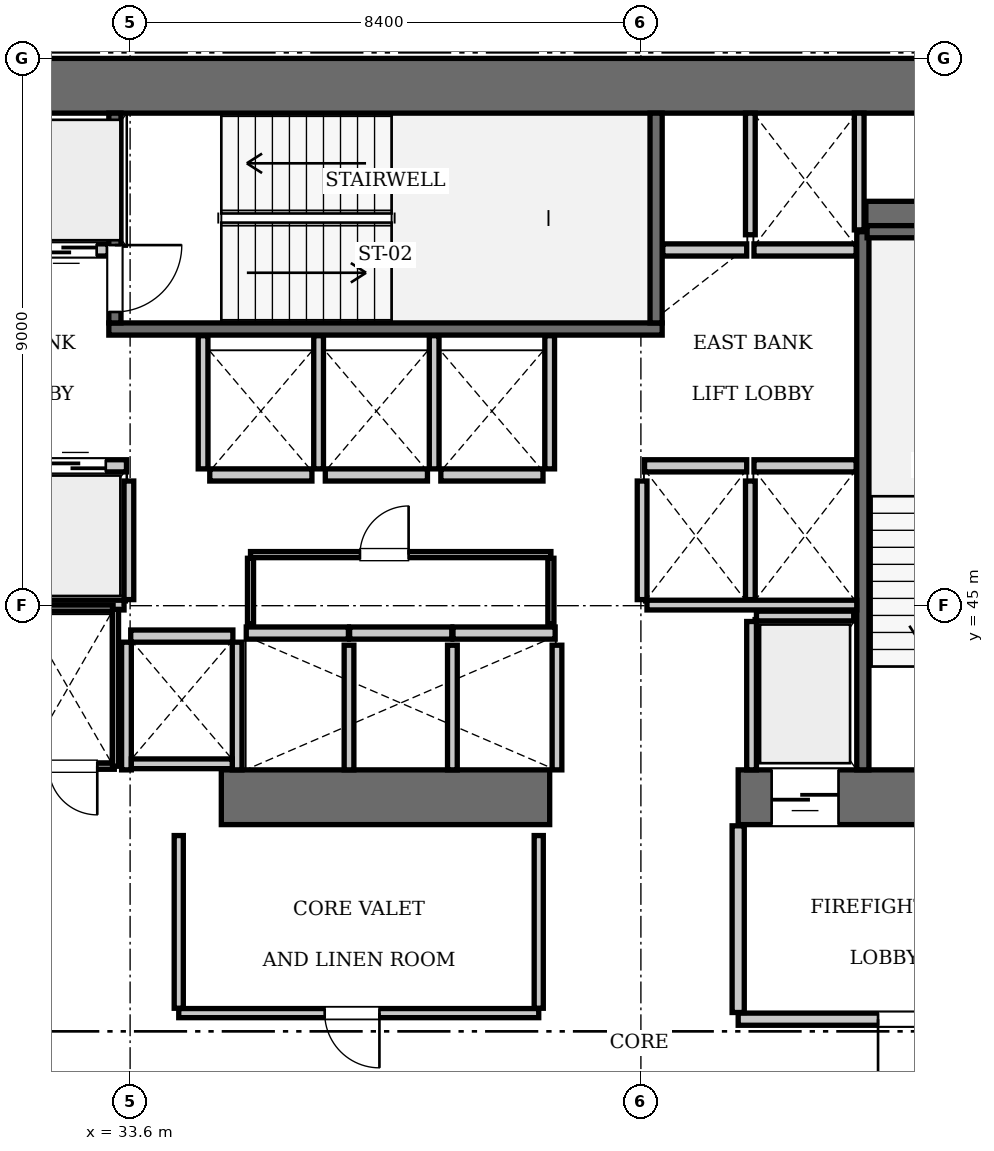
"""IFC4 building model, lengths in metres.
Left out: names, types, materials, properties, quantities, classifications, styles, units other than length and angle.
Written with IfcOpenShell. Run it as: python <this file> out.ifc"""

import sys

from ifc_helpers import new_model, si_unit, direction, frame, frame_2d, origin, place, context, subcontext, project, spatial, rectangle, extrude, element, fill, save


model = new_model("IFC4")
c1 = context("Model", 3, precision=1e-05, world=origin(), true_north=direction((0.0, 1.0)))
c2 = subcontext(c1, "Body", "Model", "MODEL_VIEW")
j1 = project(units=[si_unit("LENGTHUNIT", "METRE"), si_unit("PLANEANGLEUNIT", "RADIAN")], contexts=[c1])
p1 = place(None, origin())
s1 = spatial("IfcSite", under=j1, at=p1, CompositionType="ELEMENT")
p2 = place(p1, origin())
s2 = spatial("IfcBuilding", under=s1, at=p2, CompositionType="ELEMENT")
p3 = place(p2, frame((0.0, 0.0, 77.0)))
s3 = spatial("IfcBuildingStorey", under=s2, at=p3, CompositionType="ELEMENT", Elevation=77.0)
p4 = place(p3, frame((25.2, 53.55, 0.0), z_axis=(0.0, 0.0, 1.0), x_axis=(1.0, 0.0, 0.0)))
e1 = element("IfcWall", 1, at=p4, inside=s3, PredefinedType="SHEAR", context=c2, shape_type="SweptSolid", body=[
    extrude(rectangle(XDim=25.2, YDim=0.9, at=frame_2d((12.6, 0.0))), origin(), (0.0, 0.0, 1.0), 3.85),
])
p5 = place(p3, frame((35.1, 41.85, 0.0), z_axis=(0.0, 0.0, 1.0), x_axis=(1.0, 0.0, 0.0)))
e2 = element("IfcWall", 2, at=p5, inside=s3, PredefinedType="SHEAR", context=c2, shape_type="SweptSolid", body=[
    extrude(rectangle(XDim=5.4, YDim=0.9, at=frame_2d((2.7, 0.0))), origin(), (0.0, 0.0, 1.0), 3.85),
])
p6 = place(p3, frame((43.6, 41.85, 0.0), z_axis=(0.0, 0.0, 1.0), x_axis=(1.0, 0.0, 0.0)))
e3 = element("IfcWall", 3, at=p6, inside=s3, PredefinedType="SHEAR", context=c2, shape_type="SweptSolid", body=[
    extrude(rectangle(XDim=6.8, YDim=0.9, at=frame_2d((3.4, 0.0))), origin(), (0.0, 0.0, 1.0), 3.85),
])
p7 = place(p6, frame((3.9, 0.0, 0.0)))
e4 = element("IfcOpeningElement", 4, at=p7, cuts=e3, PredefinedType="OPENING", context=c2, shape_type="SweptSolid", body=[
    extrude(rectangle(XDim=1.15, YDim=2.15, at=frame_2d((0.575, 1.075))), frame((0.0, 0.46, 0.0), z_axis=(0.0, -1.0, 0.0), x_axis=(1.0, 0.0, 0.0)), (0.0, 0.0, 1.0), 0.92),
])
p8 = place(p6, frame((0.55, 0.0, 0.0)))
e5 = element("IfcOpeningElement", 5, at=p8, cuts=e3, PredefinedType="OPENING", context=c2, shape_type="SweptSolid", body=[
    extrude(rectangle(XDim=1.1, YDim=2.2, at=frame_2d((0.55, 1.1))), frame((0.0, 0.46, 0.0), z_axis=(0.0, -1.0, 0.0), x_axis=(1.0, 0.0, 0.0)), (0.0, 0.0, 1.0), 0.92),
])
p9 = place(p3, frame((45.7, 51.4, 0.0), z_axis=(0.0, 0.0, 1.0), x_axis=(1.0, 0.0, 0.0)))
e6 = element("IfcWall", 6, at=p9, inside=s3, PredefinedType="SHEAR", context=c2, shape_type="SweptSolid", body=[
    extrude(rectangle(XDim=3.8, YDim=0.5, at=frame_2d((1.9, 0.0))), origin(), (0.0, 0.0, 1.0), 3.85),
])
p10 = place(p3, frame((33.25, 49.55, 0.0), z_axis=(0.0, 0.0, 1.0), x_axis=(1.0, 0.0, 0.0)))
e7 = element("IfcWall", 7, at=p10, inside=s3, PredefinedType="SOLIDWALL", context=c2, shape_type="SweptSolid", body=[
    extrude(rectangle(XDim=9.1, YDim=0.2, at=frame_2d((4.55, 0.0))), origin(), (0.0, 0.0, 1.0), 3.61),
])
p11 = place(p3, frame((42.25, 49.65, 0.0), z_axis=(0.0, 0.0, 1.0), x_axis=(0.0, 1.0, 0.0)))
e8 = element("IfcWall", 8, at=p11, inside=s3, PredefinedType="SOLIDWALL", context=c2, shape_type="SweptSolid", body=[
    extrude(rectangle(XDim=3.45, YDim=0.2, at=frame_2d((1.725, 0.0))), origin(), (0.0, 0.0, 1.0), 3.61),
])
p12 = place(p3, frame((33.35, 49.65, 0.0), z_axis=(0.0, 0.0, 1.0), x_axis=(0.0, 1.0, 0.0)))
e9 = element("IfcWall", 9, at=p12, inside=s3, PredefinedType="SOLIDWALL", context=c2, shape_type="SweptSolid", body=[
    extrude(rectangle(XDim=3.45, YDim=0.2, at=frame_2d((1.725, 0.0))), origin(), (0.0, 0.0, 1.0), 3.61),
])
p13 = place(p12, frame((0.18, 0.0, 0.0)))
e10 = element("IfcOpeningElement", 10, at=p13, cuts=e9, PredefinedType="OPENING", context=c2, shape_type="SweptSolid", body=[
    extrude(rectangle(XDim=1.1, YDim=2.15, at=frame_2d((0.55, 1.075))), frame((0.0, 0.11, 0.0), z_axis=(0.0, -1.0, 0.0), x_axis=(1.0, 0.0, 0.0)), (0.0, 0.0, 1.0), 0.22),
])
p14 = place(p3, frame((45.65, 42.3, 0.0), z_axis=(0.0, 0.0, 1.0), x_axis=(0.0, 1.0, 0.0)))
e11 = element("IfcWall", 11, at=p14, inside=s3, PredefinedType="SOLIDWALL", context=c2, shape_type="SweptSolid", body=[
    extrude(rectangle(XDim=8.85, YDim=0.2, at=frame_2d((4.425, 0.0))), origin(), (0.0, 0.0, 1.0), 3.61),
])
p15 = place(p3, frame((45.72, 51.15, 0.0), z_axis=(0.0, 0.0, 1.0), x_axis=(1.0, 0.0, 0.0)))
e12 = element("IfcWall", 12, at=p15, inside=s3, PredefinedType="SOLIDWALL", context=c2, shape_type="SweptSolid", body=[
    extrude(rectangle(XDim=3.5, YDim=0.2, at=frame_2d((1.75, 0.0))), origin(), (0.0, 0.0, 1.0), 3.61),
])
p16 = place(p3, frame((31.86, 47.3, 0.0), z_axis=(0.0, 0.0, 1.0), x_axis=(1.0, 0.0, 0.0)))
e13 = element("IfcWall", 13, at=p16, inside=s3, PredefinedType="SOLIDWALL", context=c2, shape_type="SweptSolid", body=[
    extrude(rectangle(XDim=1.68, YDim=0.2, at=frame_2d((0.84, 0.0))), origin(), (0.0, 0.0, 1.0), 3.61),
])
p17 = place(p16, frame((0.34, 0.0, 0.0)))
e14 = element("IfcOpeningElement", 14, at=p17, cuts=e13, PredefinedType="OPENING", context=c2, shape_type="SweptSolid", body=[
    extrude(rectangle(XDim=1.0, YDim=2.15, at=frame_2d((0.5, 1.075))), frame((0.0, 0.11, 0.0), z_axis=(0.0, -1.0, 0.0), x_axis=(1.0, 0.0, 0.0)), (0.0, 0.0, 1.0), 0.22),
])
p18 = place(p3, frame((31.86, 50.85, 0.0), z_axis=(0.0, 0.0, 1.0), x_axis=(1.0, 0.0, 0.0)))
e15 = element("IfcWall", 15, at=p18, inside=s3, PredefinedType="SOLIDWALL", context=c2, shape_type="SweptSolid", body=[
    extrude(rectangle(XDim=1.38, YDim=0.2, at=frame_2d((0.69, 0.0))), origin(), (0.0, 0.0, 1.0), 3.61),
])
p19 = place(p18, frame((0.19, 0.0, 0.0)))
e16 = element("IfcOpeningElement", 16, at=p19, cuts=e15, PredefinedType="OPENING", context=c2, shape_type="SweptSolid", body=[
    extrude(rectangle(XDim=1.0, YDim=2.15, at=frame_2d((0.5, 1.075))), frame((0.0, 0.11, 0.0), z_axis=(0.0, -1.0, 0.0), x_axis=(1.0, 0.0, 0.0)), (0.0, 0.0, 1.0), 0.22),
])
for number, where, z_axis, x_axis in (
    (17, (42.06, 47.3, 0.0), (0.0, 0.0, 1.0), (1.0, 0.0, 0.0)),
    (18, (43.86, 47.3, 0.0), (0.0, 0.0, 1.0), (1.0, 0.0, 0.0)),
):
    element("IfcWall", number, at=place(p3, frame(where, z_axis=z_axis, x_axis=x_axis)), inside=s3, PredefinedType="SOLIDWALL", context=c2, shape_type="SweptSolid", body=[
        extrude(rectangle(XDim=1.68, YDim=0.2, at=frame_2d((0.84, 0.0))), origin(), (0.0, 0.0, 1.0), 3.61),
    ])
p20 = place(p3, frame((42.36, 50.85, 0.0), z_axis=(0.0, 0.0, 1.0), x_axis=(1.0, 0.0, 0.0)))
e19 = element("IfcWall", 19, at=p20, inside=s3, PredefinedType="SOLIDWALL", context=c2, shape_type="SweptSolid", body=[
    extrude(rectangle(XDim=1.38, YDim=0.2, at=frame_2d((0.69, 0.0))), origin(), (0.0, 0.0, 1.0), 3.61),
])
for number, where, z_axis, x_axis in (
    (20, (43.86, 50.85, 0.0), (0.0, 0.0, 1.0), (1.0, 0.0, 0.0)),
    (21, (35.51, 44.55, 0.0), (0.0, 0.0, 1.0), (1.0, 0.0, 0.0)),
    (22, (37.21, 44.55, 0.0), (0.0, 0.0, 1.0), (1.0, 0.0, 0.0)),
):
    element("IfcWall", number, at=place(p3, frame(where, z_axis=z_axis, x_axis=x_axis)), inside=s3, PredefinedType="SOLIDWALL", context=c2, shape_type="SweptSolid", body=[
        extrude(rectangle(XDim=1.68, YDim=0.2, at=frame_2d((0.84, 0.0))), origin(), (0.0, 0.0, 1.0), 3.61),
    ])
for number, where, z_axis, x_axis in (
    (23, (38.91, 44.55, 0.0), (0.0, 0.0, 1.0), (1.0, 0.0, 0.0)),
    (24, (34.91, 47.15, 0.0), (0.0, 0.0, 1.0), (1.0, 0.0, 0.0)),
):
    element("IfcWall", number, at=place(p3, frame(where, z_axis=z_axis, x_axis=x_axis)), inside=s3, PredefinedType="SOLIDWALL", context=c2, shape_type="SweptSolid", body=[
        extrude(rectangle(XDim=1.68, YDim=0.2, at=frame_2d((0.84, 0.0))), origin(), (0.0, 0.0, 1.0), 3.61),
    ])
for number, where, z_axis, x_axis in (
    (25, (36.81, 47.15, 0.0), (0.0, 0.0, 1.0), (1.0, 0.0, 0.0)),
    (26, (38.71, 47.15, 0.0), (0.0, 0.0, 1.0), (1.0, 0.0, 0.0)),
    (27, (33.61, 44.5, 0.0), (0.0, 0.0, 1.0), (1.0, 0.0, 0.0)),
):
    element("IfcWall", number, at=place(p3, frame(where, z_axis=z_axis, x_axis=x_axis)), inside=s3, PredefinedType="SOLIDWALL", context=c2, shape_type="SweptSolid", body=[
        extrude(rectangle(XDim=1.68, YDim=0.2, at=frame_2d((0.84, 0.0))), origin(), (0.0, 0.0, 1.0), 3.61),
    ])
p21 = place(p3, frame((43.9, 44.83, 0.0), z_axis=(0.0, 0.0, 1.0), x_axis=(1.0, 0.0, 0.0)))
e28 = element("IfcWall", 28, at=p21, inside=s3, PredefinedType="SOLIDWALL", context=c2, shape_type="SweptSolid", body=[
    extrude(rectangle(XDim=1.6, YDim=0.16, at=frame_2d((0.8, 0.0))), origin(), (0.0, 0.0, 1.0), 3.61),
])
p22 = place(p3, frame((43.82, 42.3, 0.0), z_axis=(0.0, 0.0, 1.0), x_axis=(0.0, 1.0, 0.0)))
e29 = element("IfcWall", 29, at=p22, inside=s3, PredefinedType="SOLIDWALL", context=c2, shape_type="SweptSolid", body=[
    extrude(rectangle(XDim=2.44, YDim=0.16, at=frame_2d((1.22, 0.0))), origin(), (0.0, 0.0, 1.0), 3.61),
])
p23 = place(p3, frame((33.58, 45.1, 0.0), z_axis=(0.0, 0.0, 1.0), x_axis=(0.0, 1.0, 0.0)))
e30 = element("IfcWall", 30, at=p23, inside=s3, PredefinedType="SOLIDWALL", context=c2, shape_type="SweptSolid", body=[
    extrude(rectangle(XDim=1.95, YDim=0.16, at=frame_2d((0.975, 0.0))), origin(), (0.0, 0.0, 1.0), 3.61),
])
p24 = place(p3, frame((30.05, 45.01, 0.0), z_axis=(0.0, 0.0, 1.0), x_axis=(1.0, 0.0, 0.0)))
e31 = element("IfcWall", 31, at=p24, inside=s3, PredefinedType="SOLIDWALL", context=c2, shape_type="SweptSolid", body=[
    extrude(rectangle(XDim=3.45, YDim=0.16, at=frame_2d((1.725, 0.0))), origin(), (0.0, 0.0, 1.0), 3.61),
])
for number, where, z_axis, x_axis in (
    (32, (42.02, 45.1, 0.0), (0.0, 0.0, 1.0), (0.0, 1.0, 0.0)),
    (33, (43.8, 45.1, 0.0), (0.0, 0.0, 1.0), (0.0, 1.0, 0.0)),
):
    element("IfcWall", number, at=place(p3, frame(where, z_axis=z_axis, x_axis=x_axis)), inside=s3, PredefinedType="SOLIDWALL", context=c2, shape_type="SweptSolid", body=[
        extrude(rectangle(XDim=1.95, YDim=0.16, at=frame_2d((0.975, 0.0))), origin(), (0.0, 0.0, 1.0), 3.61),
    ])
p25 = place(p3, frame((42.1, 45.01, 0.0), z_axis=(0.0, 0.0, 1.0), x_axis=(1.0, 0.0, 0.0)))
e34 = element("IfcWall", 34, at=p25, inside=s3, PredefinedType="SOLIDWALL", context=c2, shape_type="SweptSolid", body=[
    extrude(rectangle(XDim=3.45, YDim=0.16, at=frame_2d((1.725, 0.0))), origin(), (0.0, 0.0, 1.0), 3.61),
])
p26 = place(p3, frame((45.59, 51.18, 0.0), z_axis=(0.0, 0.0, 1.0), x_axis=(0.0, 1.0, 0.0)))
e35 = element("IfcWall", 35, at=p26, inside=s3, PredefinedType="SOLIDWALL", context=c2, shape_type="SweptSolid", body=[
    extrude(rectangle(XDim=1.92, YDim=0.16, at=frame_2d((0.96, 0.0))), origin(), (0.0, 0.0, 1.0), 3.61),
])
p27 = place(p3, frame((43.8, 51.1, 0.0), z_axis=(0.0, 0.0, 1.0), x_axis=(0.0, 1.0, 0.0)))
e36 = element("IfcWall", 36, at=p27, inside=s3, PredefinedType="SOLIDWALL", context=c2, shape_type="SweptSolid", body=[
    extrude(rectangle(XDim=2.0, YDim=0.16, at=frame_2d((1.0, 0.0))), origin(), (0.0, 0.0, 1.0), 3.61),
])
for number, where, z_axis, x_axis in (
    (37, (37.2, 42.3, 0.0), (0.0, 0.0, 1.0), (0.0, 1.0, 0.0)),
    (38, (38.9, 42.3, 0.0), (0.0, 0.0, 1.0), (0.0, 1.0, 0.0)),
    (39, (40.62, 42.3, 0.0), (0.0, 0.0, 1.0), (0.0, 1.0, 0.0)),
):
    element("IfcWall", number, at=place(p3, frame(where, z_axis=z_axis, x_axis=x_axis)), inside=s3, PredefinedType="SOLIDWALL", context=c2, shape_type="SweptSolid", body=[
        extrude(rectangle(XDim=2.05, YDim=0.16, at=frame_2d((1.025, 0.0))), origin(), (0.0, 0.0, 1.0), 3.61),
    ])
for number, where, z_axis, x_axis in (
    (40, (34.8, 47.25, 0.0), (0.0, 0.0, 1.0), (0.0, 1.0, 0.0)),
    (41, (36.7, 47.25, 0.0), (0.0, 0.0, 1.0), (0.0, 1.0, 0.0)),
    (42, (38.6, 47.25, 0.0), (0.0, 0.0, 1.0), (0.0, 1.0, 0.0)),
    (43, (40.5, 47.25, 0.0), (0.0, 0.0, 1.0), (0.0, 1.0, 0.0)),
):
    element("IfcWall", number, at=place(p3, frame(where, z_axis=z_axis, x_axis=x_axis)), inside=s3, PredefinedType="SOLIDWALL", context=c2, shape_type="SweptSolid", body=[
        extrude(rectangle(XDim=2.19, YDim=0.16, at=frame_2d((1.095, 0.0))), origin(), (0.0, 0.0, 1.0), 3.61),
    ])
for number, where, z_axis, x_axis in (
    (44, (33.54, 42.3, 0.0), (0.0, 0.0, 1.0), (0.0, 1.0, 0.0)),
    (45, (35.36, 42.3, 0.0), (0.0, 0.0, 1.0), (0.0, 1.0, 0.0)),
):
    element("IfcWall", number, at=place(p3, frame(where, z_axis=z_axis, x_axis=x_axis)), inside=s3, PredefinedType="SOLIDWALL", context=c2, shape_type="SweptSolid", body=[
        extrude(rectangle(XDim=2.1, YDim=0.16, at=frame_2d((1.05, 0.0))), origin(), (0.0, 0.0, 1.0), 3.61),
    ])
p28 = place(p3, frame((33.62, 42.4, 0.0), z_axis=(0.0, 0.0, 1.0), x_axis=(1.0, 0.0, 0.0)))
e46 = element("IfcWall", 46, at=p28, inside=s3, PredefinedType="SOLIDWALL", context=c2, shape_type="SweptSolid", body=[
    extrude(rectangle(XDim=1.66, YDim=0.16, at=frame_2d((0.83, 0.0))), origin(), (0.0, 0.0, 1.0), 3.61),
])
p29 = place(p3, frame((43.6, 38.2, 0.0), z_axis=(0.0, 0.0, 1.0), x_axis=(1.0, 0.0, 0.0)))
e47 = element("IfcWall", 47, at=p29, inside=s3, PredefinedType="PARTITIONING", context=c2, shape_type="SweptSolid", body=[
    extrude(rectangle(XDim=5.8, YDim=0.2, at=frame_2d((2.9, 0.0))), origin(), (0.0, 0.0, 1.0), 3.61),
])
p30 = place(p29, frame((2.3, 0.0, 0.0)))
e48 = element("IfcOpeningElement", 48, at=p30, cuts=e47, PredefinedType="OPENING", context=c2, shape_type="SweptSolid", body=[
    extrude(rectangle(XDim=1.15, YDim=2.15, at=frame_2d((0.575, 1.075))), frame((0.0, 0.11, 0.0), z_axis=(0.0, -1.0, 0.0), x_axis=(1.0, 0.0, 0.0)), (0.0, 0.0, 1.0), 0.22),
])
p31 = place(p3, frame((43.6, 38.31, 0.0), z_axis=(0.0, 0.0, 1.0), x_axis=(0.0, 1.0, 0.0)))
e49 = element("IfcWall", 49, at=p31, inside=s3, PredefinedType="PARTITIONING", context=c2, shape_type="SweptSolid", body=[
    extrude(rectangle(XDim=3.07, YDim=0.2, at=frame_2d((1.535, 0.0))), origin(), (0.0, 0.0, 1.0), 3.61),
])
p32 = place(p3, frame((32.02, 42.36, 0.0), z_axis=(0.0, 0.0, 1.0), x_axis=(1.0, 0.0, 0.0)))
e50 = element("IfcWall", 50, at=p32, inside=s3, PredefinedType="PARTITIONING", context=c2, shape_type="SweptSolid", body=[
    extrude(rectangle(XDim=1.32, YDim=0.1, at=frame_2d((0.66, 0.0))), origin(), (0.0, 0.0, 1.0), 3.61),
])
p33 = place(p32, frame((0.24, 0.0, 0.0)))
e51 = element("IfcOpeningElement", 51, at=p33, cuts=e50, PredefinedType="OPENING", context=c2, shape_type="SweptSolid", body=[
    extrude(rectangle(XDim=0.8, YDim=2.05, at=frame_2d((0.4, 1.025))), frame((0.0, 0.06, 0.0), z_axis=(0.0, -1.0, 0.0), x_axis=(1.0, 0.0, 0.0)), (0.0, 0.0, 1.0), 0.12),
])
p34 = place(p3, frame((31.84, 44.96, 0.0), z_axis=(0.0, 0.0, 1.0), x_axis=(1.0, 0.0, 0.0)))
e52 = element("IfcWall", 52, at=p34, inside=s3, PredefinedType="PARTITIONING", context=c2, shape_type="SweptSolid", body=[
    extrude(rectangle(XDim=1.48, YDim=0.1, at=frame_2d((0.74, 0.0))), origin(), (0.0, 0.0, 1.0), 3.61),
])
p35 = place(p3, frame((33.36, 42.36, 0.0), z_axis=(0.0, 0.0, 1.0), x_axis=(0.0, 1.0, 0.0)))
e53 = element("IfcWall", 53, at=p35, inside=s3, PredefinedType="PARTITIONING", context=c2, shape_type="SweptSolid", body=[
    extrude(rectangle(XDim=2.58, YDim=0.1, at=frame_2d((1.29, 0.0))), origin(), (0.0, 0.0, 1.0), 3.61),
])
p36 = place(p3, frame((35.58, 45.84, 0.0), z_axis=(0.0, 0.0, 1.0), x_axis=(1.0, 0.0, 0.0)))
e54 = element("IfcWall", 54, at=p36, inside=s3, PredefinedType="PARTITIONING", context=c2, shape_type="SweptSolid", body=[
    extrude(rectangle(XDim=4.94, YDim=0.1, at=frame_2d((2.47, 0.0))), origin(), (0.0, 0.0, 1.0), 3.61),
])
p37 = place(p36, frame((1.8, 0.0, 0.0)))
e55 = element("IfcOpeningElement", 55, at=p37, cuts=e54, PredefinedType="OPENING", context=c2, shape_type="SweptSolid", body=[
    extrude(rectangle(XDim=0.8, YDim=2.05, at=frame_2d((0.4, 1.025))), frame((0.0, 0.06, 0.0), z_axis=(0.0, -1.0, 0.0), x_axis=(1.0, 0.0, 0.0)), (0.0, 0.0, 1.0), 0.12),
])
for number, where, z_axis, x_axis in (
    (56, (35.58, 44.7, 0.0), (0.0, 0.0, 1.0), (0.0, 1.0, 0.0)),
    (57, (40.52, 44.7, 0.0), (0.0, 0.0, 1.0), (0.0, 1.0, 0.0)),
):
    element("IfcWall", number, at=place(p3, frame(where, z_axis=z_axis, x_axis=x_axis)), inside=s3, PredefinedType="PARTITIONING", context=c2, shape_type="SweptSolid", body=[
        extrude(rectangle(XDim=1.08, YDim=0.1, at=frame_2d((0.54, 0.0))), origin(), (0.0, 0.0, 1.0), 3.61),
    ])
p38 = place(p3, frame((34.4, 38.3, 0.0), z_axis=(0.0, 0.0, 1.0), x_axis=(1.0, 0.0, 0.0)))
e58 = element("IfcWall", 58, at=p38, inside=s3, PredefinedType="PARTITIONING", context=c2, shape_type="SweptSolid", body=[
    extrude(rectangle(XDim=5.92, YDim=0.15, at=frame_2d((2.96, 0.0))), origin(), (0.0, 0.0, 1.0), 3.61),
])
p39 = place(p38, frame((2.4, 0.0, 0.0)))
e59 = element("IfcOpeningElement", 59, at=p39, cuts=e58, PredefinedType="OPENING", context=c2, shape_type="SweptSolid", body=[
    extrude(rectangle(XDim=0.9, YDim=2.1, at=frame_2d((0.45, 1.05))), frame((0.0, 0.085, 0.0), z_axis=(0.0, -1.0, 0.0), x_axis=(1.0, 0.0, 0.0)), (0.0, 0.0, 1.0), 0.17),
])
for number, where, z_axis, x_axis in (
    (60, (34.4, 38.38, 0.0), (0.0, 0.0, 1.0), (0.0, 1.0, 0.0)),
    (61, (40.32, 38.38, 0.0), (0.0, 0.0, 1.0), (0.0, 1.0, 0.0)),
):
    element("IfcWall", number, at=place(p3, frame(where, z_axis=z_axis, x_axis=x_axis)), inside=s3, PredefinedType="PARTITIONING", context=c2, shape_type="SweptSolid", body=[
        extrude(rectangle(XDim=2.84, YDim=0.15, at=frame_2d((1.42, 0.0))), origin(), (0.0, 0.0, 1.0), 3.61),
    ])
p40 = place(p13, frame((1.1, 0.0, 0.0), z_axis=(0.0, 0.0, 1.0), x_axis=(-1.0, 0.0, 0.0)))
e62 = element("IfcDoor", 62, at=p40, inside=s3, OperationType="SINGLE_SWING_LEFT", PredefinedType="DOOR", context=c2, shape_type="SweptSolid", body=[
    extrude(rectangle(XDim=1.1, YDim=2.15, at=frame_2d((0.55, 1.075))), frame((0.0, 0.025, 0.0), z_axis=(0.0, -1.0, 0.0), x_axis=(1.0, 0.0, 0.0)), (0.0, 0.0, 1.0), 0.05),
])
fill(e10, e62)
p41 = place(p17, origin())
e63 = element("IfcDoor", 63, at=p41, inside=s3, OperationType="SLIDING_TO_LEFT", PredefinedType="DOOR", context=c2, shape_type="SweptSolid", body=[
    extrude(rectangle(XDim=1.0, YDim=2.15, at=frame_2d((0.5, 1.075))), frame((0.0, 0.025, 0.0), z_axis=(0.0, -1.0, 0.0), x_axis=(1.0, 0.0, 0.0)), (0.0, 0.0, 1.0), 0.05),
])
fill(e14, e63)
p42 = place(p19, frame((1.0, 0.0, 0.0), z_axis=(0.0, 0.0, 1.0), x_axis=(-1.0, 0.0, 0.0)))
e64 = element("IfcDoor", 64, at=p42, inside=s3, OperationType="SLIDING_TO_LEFT", PredefinedType="DOOR", context=c2, shape_type="SweptSolid", body=[
    extrude(rectangle(XDim=1.0, YDim=2.15, at=frame_2d((0.5, 1.075))), frame((0.0, 0.025, 0.0), z_axis=(0.0, -1.0, 0.0), x_axis=(1.0, 0.0, 0.0)), (0.0, 0.0, 1.0), 0.05),
])
fill(e16, e64)
p43 = place(p8, frame((1.1, 0.0, 0.0), z_axis=(0.0, 0.0, 1.0), x_axis=(-1.0, 0.0, 0.0)))
e65 = element("IfcDoor", 65, at=p43, inside=s3, OperationType="SLIDING_TO_LEFT", PredefinedType="DOOR", context=c2, shape_type="SweptSolid", body=[
    extrude(rectangle(XDim=1.1, YDim=2.2, at=frame_2d((0.55, 1.1))), frame((0.0, 0.025, 0.0), z_axis=(0.0, -1.0, 0.0), x_axis=(1.0, 0.0, 0.0)), (0.0, 0.0, 1.0), 0.05),
])
fill(e5, e65)
p44 = place(p30, frame((1.15, 0.0, 0.0), z_axis=(0.0, 0.0, 1.0), x_axis=(-1.0, 0.0, 0.0)))
e66 = element("IfcDoor", 66, at=p44, inside=s3, OperationType="SINGLE_SWING_RIGHT", PredefinedType="DOOR", context=c2, shape_type="SweptSolid", body=[
    extrude(rectangle(XDim=1.15, YDim=2.15, at=frame_2d((0.575, 1.075))), frame((0.0, 0.025, 0.0), z_axis=(0.0, -1.0, 0.0), x_axis=(1.0, 0.0, 0.0)), (0.0, 0.0, 1.0), 0.05),
])
fill(e48, e66)
p45 = place(p33, frame((0.8, 0.0, 0.0), z_axis=(0.0, 0.0, 1.0), x_axis=(-1.0, 0.0, 0.0)))
e67 = element("IfcDoor", 67, at=p45, inside=s3, OperationType="SINGLE_SWING_LEFT", PredefinedType="DOOR", context=c2, shape_type="SweptSolid", body=[
    extrude(rectangle(XDim=0.8, YDim=2.05, at=frame_2d((0.4, 1.025))), frame((0.0, 0.025, 0.0), z_axis=(0.0, -1.0, 0.0), x_axis=(1.0, 0.0, 0.0)), (0.0, 0.0, 1.0), 0.05),
])
fill(e51, e67)
p46 = place(p37, origin())
e68 = element("IfcDoor", 68, at=p46, inside=s3, OperationType="SINGLE_SWING_RIGHT", PredefinedType="DOOR", context=c2, shape_type="SweptSolid", body=[
    extrude(rectangle(XDim=0.8, YDim=2.05, at=frame_2d((0.4, 1.025))), frame((0.0, 0.025, 0.0), z_axis=(0.0, -1.0, 0.0), x_axis=(1.0, 0.0, 0.0)), (0.0, 0.0, 1.0), 0.05),
])
fill(e55, e68)
p47 = place(p39, frame((0.9, 0.0, 0.0), z_axis=(0.0, 0.0, 1.0), x_axis=(-1.0, 0.0, 0.0)))
e69 = element("IfcDoor", 69, at=p47, inside=s3, OperationType="SINGLE_SWING_LEFT", PredefinedType="DOOR", context=c2, shape_type="SweptSolid", body=[
    extrude(rectangle(XDim=0.9, YDim=2.1, at=frame_2d((0.45, 1.05))), frame((0.0, 0.025, 0.0), z_axis=(0.0, -1.0, 0.0), x_axis=(1.0, 0.0, 0.0)), (0.0, 0.0, 1.0), 0.05),
])
fill(e59, e69)
save(model, sys.argv[1])
